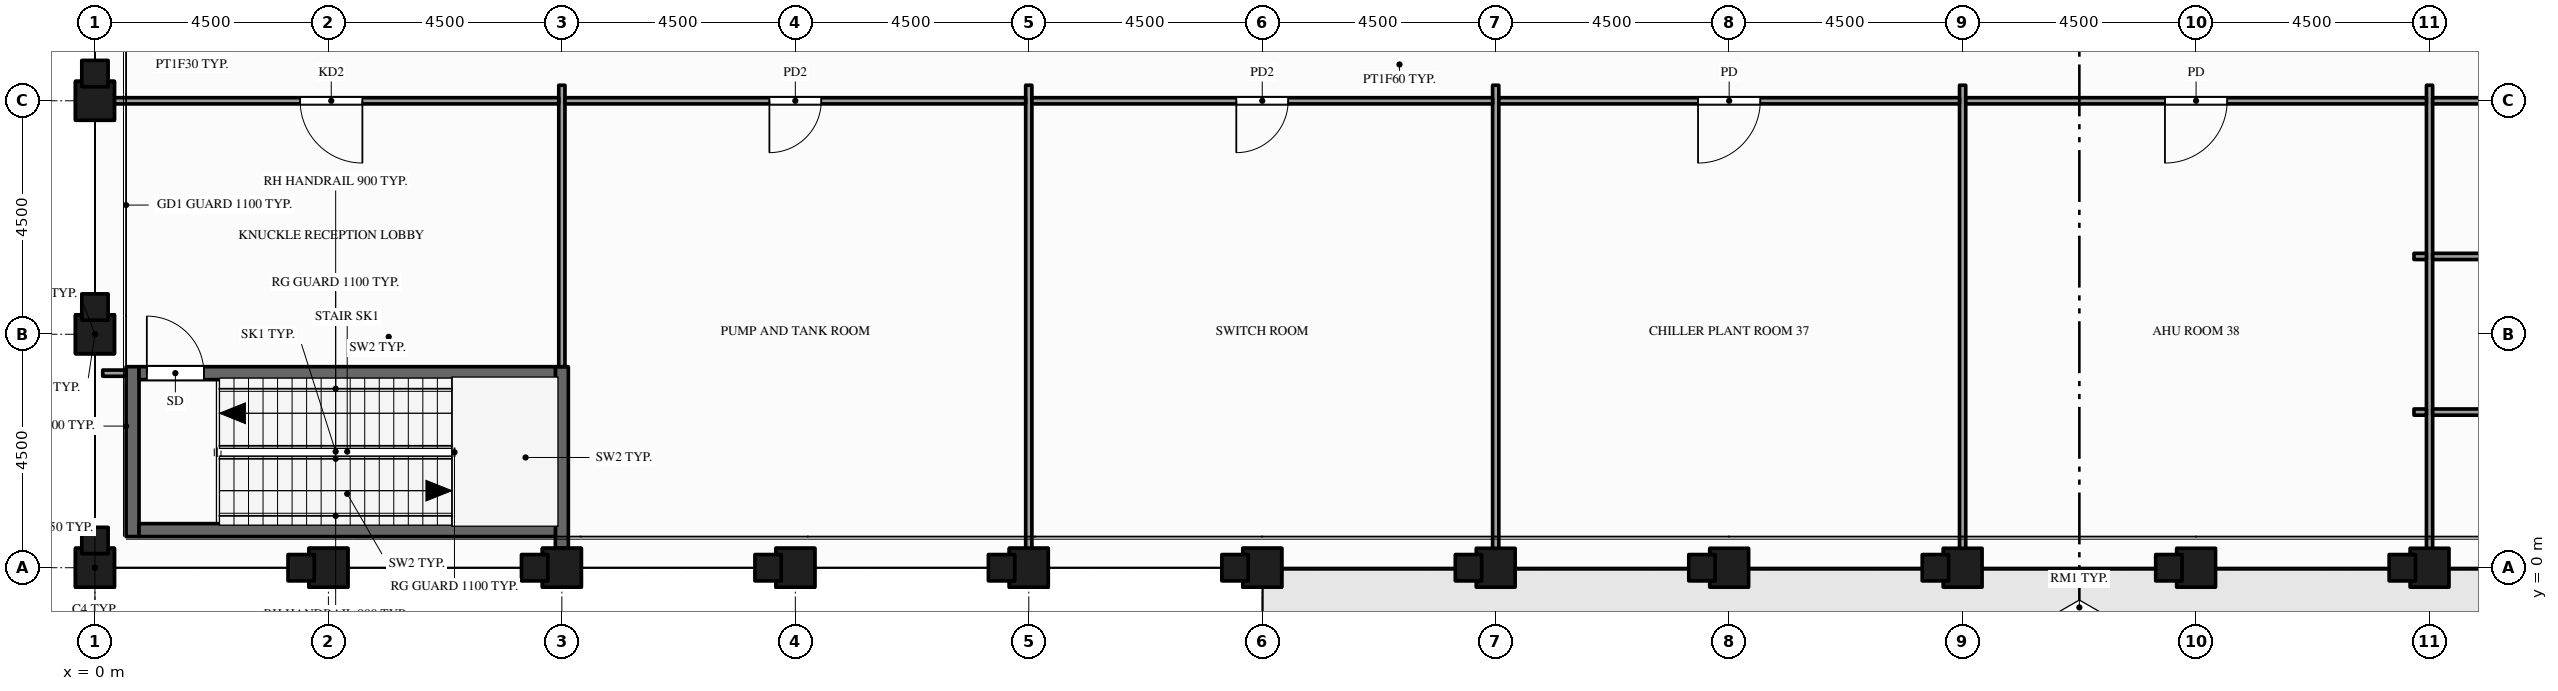
"""IFC4 building model, lengths in metres.
Left out: names, types, materials, properties, quantities, classifications, styles, units other than length and angle.
Written with IfcOpenShell. Run it as: python <this file> out.ifc"""

import sys

from ifc_helpers import new_model, si_unit, direction, frame, frame_2d, origin, origin_2d, place, context, subcontext, project, spatial, rectangle, hollow_rectangle, extrude, element, fill, save


model = new_model("IFC4")
c1 = context("Model", 3, precision=1e-05, world=origin(), true_north=direction((0.0, 1.0)))
c2 = subcontext(c1, "Body", "Model", "MODEL_VIEW")
j1 = project(units=[si_unit("LENGTHUNIT", "METRE"), si_unit("PLANEANGLEUNIT", "RADIAN")], contexts=[c1])
p1 = place(None, origin())
s1 = spatial("IfcSite", under=j1, at=p1, CompositionType="ELEMENT")
p2 = place(p1, origin())
s2 = spatial("IfcBuilding", under=s1, at=p2, CompositionType="ELEMENT")
p3 = place(p2, frame((0.0, 0.0, 243.0)))
s3 = spatial("IfcBuildingStorey", under=s2, at=p3, CompositionType="ELEMENT", Elevation=243.0)
p4 = place(p3, frame((0.0, 0.0, -0.25), z_axis=(0.0, 0.0, 1.0), x_axis=(1.0, 0.0, 0.0)))
e1 = element("IfcColumn", 1, at=p4, inside=s3, PredefinedType="COLUMN", context=c2, shape_type="SweptSolid", body=[
    extrude(hollow_rectangle(XDim=0.75, YDim=0.75, WallThickness=0.036, at=origin_2d()), origin(), (0.0, 0.0, 1.0), 4.6),
])
p5 = place(p3, frame((0.0, 0.0, 4.35), z_axis=(0.0, 0.0, 1.0), x_axis=(1.0, 0.0, 0.0)))
e2 = element("IfcColumn", 2, at=p5, inside=s3, PredefinedType="COLUMN", context=c2, shape_type="SweptSolid", body=[
    extrude(rectangle(XDim=0.75, YDim=0.75, at=origin_2d()), origin(), (0.0, 0.0, 1.0), 1.5),
])
p6 = place(p3, frame((0.0, 4.5, -0.25), z_axis=(0.0, 0.0, 1.0), x_axis=(1.0, 0.0, 0.0)))
e3 = element("IfcColumn", 3, at=p6, inside=s3, PredefinedType="COLUMN", context=c2, shape_type="SweptSolid", body=[
    extrude(hollow_rectangle(XDim=0.75, YDim=0.75, WallThickness=0.036, at=origin_2d()), origin(), (0.0, 0.0, 1.0), 4.6),
])
p7 = place(p3, frame((0.0, 4.5, 4.35), z_axis=(0.0, 0.0, 1.0), x_axis=(1.0, 0.0, 0.0)))
e4 = element("IfcColumn", 4, at=p7, inside=s3, PredefinedType="COLUMN", context=c2, shape_type="SweptSolid", body=[
    extrude(rectangle(XDim=0.75, YDim=0.75, at=origin_2d()), origin(), (0.0, 0.0, 1.0), 1.5),
])
p8 = place(p3, frame((0.0, 9.0, -0.25), z_axis=(0.0, 0.0, 1.0), x_axis=(1.0, 0.0, 0.0)))
e5 = element("IfcColumn", 5, at=p8, inside=s3, PredefinedType="COLUMN", context=c2, shape_type="SweptSolid", body=[
    extrude(hollow_rectangle(XDim=0.75, YDim=0.75, WallThickness=0.036, at=origin_2d()), origin(), (0.0, 0.0, 1.0), 4.6),
])
p9 = place(p3, frame((0.0, 9.0, 4.35), z_axis=(0.0, 0.0, 1.0), x_axis=(1.0, 0.0, 0.0)))
e6 = element("IfcColumn", 6, at=p9, inside=s3, PredefinedType="COLUMN", context=c2, shape_type="SweptSolid", body=[
    extrude(rectangle(XDim=0.75, YDim=0.75, at=origin_2d()), origin(), (0.0, 0.0, 1.0), 1.5),
])
p10 = place(p3, frame((4.5, 0.0, -0.25), z_axis=(0.0, 0.0, 1.0), x_axis=(1.0, 0.0, 0.0)))
e7 = element("IfcColumn", 7, at=p10, inside=s3, PredefinedType="COLUMN", context=c2, shape_type="SweptSolid", body=[
    extrude(hollow_rectangle(XDim=0.75, YDim=0.75, WallThickness=0.036, at=origin_2d()), origin(), (0.0, 0.0, 1.0), 4.6),
])
p11 = place(p3, frame((4.5, 0.0, 4.35), z_axis=(0.0, 0.0, 1.0), x_axis=(1.0, 0.0, 0.0)))
e8 = element("IfcColumn", 8, at=p11, inside=s3, PredefinedType="COLUMN", context=c2, shape_type="SweptSolid", body=[
    extrude(rectangle(XDim=0.75, YDim=0.75, at=origin_2d()), origin(), (0.0, 0.0, 1.0), 1.5),
])
p12 = place(p3, frame((9.0, 0.0, -0.25), z_axis=(0.0, 0.0, 1.0), x_axis=(1.0, 0.0, 0.0)))
e9 = element("IfcColumn", 9, at=p12, inside=s3, PredefinedType="COLUMN", context=c2, shape_type="SweptSolid", body=[
    extrude(hollow_rectangle(XDim=0.75, YDim=0.75, WallThickness=0.036, at=origin_2d()), origin(), (0.0, 0.0, 1.0), 4.6),
])
p13 = place(p3, frame((9.0, 0.0, 4.35), z_axis=(0.0, 0.0, 1.0), x_axis=(1.0, 0.0, 0.0)))
e10 = element("IfcColumn", 10, at=p13, inside=s3, PredefinedType="COLUMN", context=c2, shape_type="SweptSolid", body=[
    extrude(rectangle(XDim=0.75, YDim=0.75, at=origin_2d()), origin(), (0.0, 0.0, 1.0), 1.5),
])
p14 = place(p3, frame((13.5, 0.0, -0.25), z_axis=(0.0, 0.0, 1.0), x_axis=(1.0, 0.0, 0.0)))
e11 = element("IfcColumn", 11, at=p14, inside=s3, PredefinedType="COLUMN", context=c2, shape_type="SweptSolid", body=[
    extrude(hollow_rectangle(XDim=0.75, YDim=0.75, WallThickness=0.036, at=origin_2d()), origin(), (0.0, 0.0, 1.0), 4.6),
])
p15 = place(p3, frame((13.5, 0.0, 4.35), z_axis=(0.0, 0.0, 1.0), x_axis=(1.0, 0.0, 0.0)))
e12 = element("IfcColumn", 12, at=p15, inside=s3, PredefinedType="COLUMN", context=c2, shape_type="SweptSolid", body=[
    extrude(rectangle(XDim=0.75, YDim=0.75, at=origin_2d()), origin(), (0.0, 0.0, 1.0), 1.5),
])
p16 = place(p3, frame((18.0, 0.0, -0.25), z_axis=(0.0, 0.0, 1.0), x_axis=(1.0, 0.0, 0.0)))
e13 = element("IfcColumn", 13, at=p16, inside=s3, PredefinedType="COLUMN", context=c2, shape_type="SweptSolid", body=[
    extrude(hollow_rectangle(XDim=0.75, YDim=0.75, WallThickness=0.036, at=origin_2d()), origin(), (0.0, 0.0, 1.0), 4.6),
])
p17 = place(p3, frame((18.0, 0.0, 4.35), z_axis=(0.0, 0.0, 1.0), x_axis=(1.0, 0.0, 0.0)))
e14 = element("IfcColumn", 14, at=p17, inside=s3, PredefinedType="COLUMN", context=c2, shape_type="SweptSolid", body=[
    extrude(rectangle(XDim=0.75, YDim=0.75, at=origin_2d()), origin(), (0.0, 0.0, 1.0), 1.5),
])
p18 = place(p3, frame((22.5, 0.0, -0.3), z_axis=(0.0, 0.0, 1.0), x_axis=(1.0, 0.0, 0.0)))
e15 = element("IfcColumn", 15, at=p18, inside=s3, PredefinedType="COLUMN", context=c2, shape_type="SweptSolid", body=[
    extrude(hollow_rectangle(XDim=0.75, YDim=0.75, WallThickness=0.036, at=origin_2d()), origin(), (0.0, 0.0, 1.0), 4.65),
])
p19 = place(p3, frame((22.5, 0.0, 4.35), z_axis=(0.0, 0.0, 1.0), x_axis=(1.0, 0.0, 0.0)))
e16 = element("IfcColumn", 16, at=p19, inside=s3, PredefinedType="COLUMN", context=c2, shape_type="SweptSolid", body=[
    extrude(rectangle(XDim=0.75, YDim=0.75, at=origin_2d()), origin(), (0.0, 0.0, 1.0), 1.5),
])
for number, where, z_axis, x_axis in (
    (17, (27.0, 0.0, -0.3), (0.0, 0.0, 1.0), (1.0, 0.0, 0.0)),
    (18, (31.5, 0.0, -0.3), (0.0, 0.0, 1.0), (1.0, 0.0, 0.0)),
    (19, (36.0, 0.0, -0.3), (0.0, 0.0, 1.0), (1.0, 0.0, 0.0)),
    (20, (40.5, 0.0, -0.3), (0.0, 0.0, 1.0), (1.0, 0.0, 0.0)),
    (21, (45.0, 0.0, -0.3), (0.0, 0.0, 1.0), (1.0, 0.0, 0.0)),
):
    element("IfcColumn", number, at=place(p3, frame(where, z_axis=z_axis, x_axis=x_axis)), inside=s3, PredefinedType="COLUMN", context=c2, shape_type="SweptSolid", body=[
        extrude(hollow_rectangle(XDim=0.75, YDim=0.75, WallThickness=0.036, at=origin_2d()), origin(), (0.0, 0.0, 1.0), 6.15),
    ])
p20 = place(p3, frame((0.725, 0.6, 0.0), z_axis=(0.0, 0.0, 1.0), x_axis=(0.0, 1.0, 0.0)))
e22 = element("IfcWall", 22, at=p20, inside=s3, PredefinedType="SHEAR", context=c2, shape_type="SweptSolid", body=[
    extrude(rectangle(XDim=3.275, YDim=0.25, at=frame_2d((1.637, 0.0))), origin(), (0.0, 0.0, 1.0), 5.85),
])
p21 = place(p3, frame((9.0, 0.375, 0.0), z_axis=(0.0, 0.0, 1.0), x_axis=(0.0, 1.0, 0.0)))
e23 = element("IfcWall", 23, at=p21, inside=s3, PredefinedType="SHEAR", context=c2, shape_type="SweptSolid", body=[
    extrude(rectangle(XDim=3.5, YDim=0.25, at=frame_2d((1.75, 0.0))), origin(), (0.0, 0.0, 1.0), 5.85),
])
p22 = place(p3, frame((9.0, 3.875, 0.0), z_axis=(0.0, 0.0, 1.0), x_axis=(0.0, 1.0, 0.0)))
e24 = element("IfcWall", 24, at=p22, inside=s3, PredefinedType="PARTITIONING", context=c2, shape_type="SweptSolid", body=[
    extrude(rectangle(XDim=5.425, YDim=0.12, at=frame_2d((2.712, 0.0))), origin(), (0.0, 0.0, 1.0), 4.87),
])
p23 = place(p3, frame((18.0, 0.15, 0.0), z_axis=(0.0, 0.0, 1.0), x_axis=(0.0, 1.0, 0.0)))
e25 = element("IfcWall", 25, at=p23, inside=s3, PredefinedType="PARTITIONING", context=c2, shape_type="SweptSolid", body=[
    extrude(rectangle(XDim=9.15, YDim=0.12, at=frame_2d((4.575, 0.0))), origin(), (0.0, 0.0, 1.0), 4.87),
])
for number, where, z_axis, x_axis in (
    (26, (27.0, 0.15, 0.0), (0.0, 0.0, 1.0), (0.0, 1.0, 0.0)),
    (27, (36.0, 0.15, 0.0), (0.0, 0.0, 1.0), (0.0, 1.0, 0.0)),
    (28, (45.0, 0.15, 0.0), (0.0, 0.0, 1.0), (0.0, 1.0, 0.0)),
):
    element("IfcWall", number, at=place(p3, frame(where, z_axis=z_axis, x_axis=x_axis)), inside=s3, PredefinedType="PARTITIONING", context=c2, shape_type="SweptSolid", body=[
        extrude(rectangle(XDim=9.15, YDim=0.12, at=frame_2d((4.575, 0.0))), origin(), (0.0, 0.0, 1.0), 4.45),
    ])
p24 = place(p3, frame((0.85, 0.725, 0.0), z_axis=(0.0, 0.0, 1.0), x_axis=(1.0, 0.0, 0.0)))
e29 = element("IfcWall", 29, at=p24, inside=s3, PredefinedType="SHEAR", context=c2, shape_type="SweptSolid", body=[
    extrude(rectangle(XDim=8.025, YDim=0.25, at=frame_2d((4.012, 0.0))), origin(), (0.0, 0.0, 1.0), 5.85),
])
p25 = place(p3, frame((44.7, 3.0, 0.0), z_axis=(0.0, 0.0, 1.0), x_axis=(1.0, 0.0, 0.0)))
e30 = element("IfcWall", 30, at=p25, inside=s3, PredefinedType="PARTITIONING", context=c2, shape_type="SweptSolid", body=[
    extrude(rectangle(XDim=0.24, YDim=0.12, at=frame_2d((0.12, 0.0))), origin(), (0.0, 0.0, 1.0), 4.87),
])
p26 = place(p3, frame((45.06, 3.0, 0.0), z_axis=(0.0, 0.0, 1.0), x_axis=(1.0, 0.0, 0.0)))
e31 = element("IfcWall", 31, at=p26, inside=s3, PredefinedType="PARTITIONING", context=c2, shape_type="SweptSolid", body=[
    extrude(rectangle(XDim=4.38, YDim=0.12, at=frame_2d((2.19, 0.0))), origin(), (0.0, 0.0, 1.0), 4.87),
])
p27 = place(p3, frame((0.15, 3.75, 0.0), z_axis=(0.0, 0.0, 1.0), x_axis=(1.0, 0.0, 0.0)))
e32 = element("IfcWall", 32, at=p27, inside=s3, PredefinedType="PARTITIONING", context=c2, shape_type="SweptSolid", body=[
    extrude(rectangle(XDim=0.45, YDim=0.12, at=frame_2d((0.225, 0.0))), origin(), (0.0, 0.0, 1.0), 5.85),
])
p28 = place(p3, frame((0.85, 3.75, 0.0), z_axis=(0.0, 0.0, 1.0), x_axis=(1.0, 0.0, 0.0)))
e33 = element("IfcWall", 33, at=p28, inside=s3, PredefinedType="SHEAR", context=c2, shape_type="SweptSolid", body=[
    extrude(rectangle(XDim=8.025, YDim=0.25, at=frame_2d((4.012, 0.0))), origin(), (0.0, 0.0, 1.0), 5.85),
])
p29 = place(p28, frame((0.15, 0.0, 0.0)))
e34 = element("IfcOpeningElement", 34, at=p29, cuts=e33, PredefinedType="OPENING", context=c2, shape_type="SweptSolid", body=[
    extrude(rectangle(XDim=1.1, YDim=2.1, at=frame_2d((0.55, 1.05))), frame((0.0, 0.135, 0.0), z_axis=(0.0, -1.0, 0.0), x_axis=(1.0, 0.0, 0.0)), (0.0, 0.0, 1.0), 0.27),
])
p30 = place(p3, frame((44.7, 6.0, 0.0), z_axis=(0.0, 0.0, 1.0), x_axis=(1.0, 0.0, 0.0)))
e35 = element("IfcWall", 35, at=p30, inside=s3, PredefinedType="PARTITIONING", context=c2, shape_type="SweptSolid", body=[
    extrude(rectangle(XDim=0.24, YDim=0.12, at=frame_2d((0.12, 0.0))), origin(), (0.0, 0.0, 1.0), 4.87),
])
p31 = place(p3, frame((45.06, 6.0, 0.0), z_axis=(0.0, 0.0, 1.0), x_axis=(1.0, 0.0, 0.0)))
e36 = element("IfcWall", 36, at=p31, inside=s3, PredefinedType="PARTITIONING", context=c2, shape_type="SweptSolid", body=[
    extrude(rectangle(XDim=4.38, YDim=0.12, at=frame_2d((2.19, 0.0))), origin(), (0.0, 0.0, 1.0), 4.87),
])
p32 = place(p3, frame((0.15, 9.0, 0.0), z_axis=(0.0, 0.0, 1.0), x_axis=(1.0, 0.0, 0.0)))
e37 = element("IfcWall", 37, at=p32, inside=s3, PredefinedType="PARTITIONING", context=c2, shape_type="SweptSolid", body=[
    extrude(rectangle(XDim=8.79, YDim=0.12, at=frame_2d((4.395, 0.0))), origin(), (0.0, 0.0, 1.0), 4.87),
])
p33 = place(p32, frame((3.805, 0.0, 0.0)))
e38 = element("IfcOpeningElement", 38, at=p33, cuts=e37, PredefinedType="OPENING", context=c2, shape_type="SweptSolid", body=[
    extrude(rectangle(XDim=1.2, YDim=2.1, at=frame_2d((0.6, 1.05))), frame((0.0, 0.07, 0.0), z_axis=(0.0, -1.0, 0.0), x_axis=(1.0, 0.0, 0.0)), (0.0, 0.0, 1.0), 0.14),
])
p34 = place(p3, frame((9.06, 9.0, 0.0), z_axis=(0.0, 0.0, 1.0), x_axis=(1.0, 0.0, 0.0)))
e39 = element("IfcWall", 39, at=p34, inside=s3, PredefinedType="PARTITIONING", context=c2, shape_type="SweptSolid", body=[
    extrude(rectangle(XDim=8.88, YDim=0.12, at=frame_2d((4.44, 0.0))), origin(), (0.0, 0.0, 1.0), 4.87),
])
p35 = place(p34, frame((3.94, 0.0, 0.0)))
e40 = element("IfcOpeningElement", 40, at=p35, cuts=e39, PredefinedType="OPENING", context=c2, shape_type="SweptSolid", body=[
    extrude(rectangle(XDim=1.0, YDim=2.1, at=frame_2d((0.5, 1.05))), frame((0.0, 0.07, 0.0), z_axis=(0.0, -1.0, 0.0), x_axis=(1.0, 0.0, 0.0)), (0.0, 0.0, 1.0), 0.14),
])
p36 = place(p3, frame((18.06, 9.0, 0.0), z_axis=(0.0, 0.0, 1.0), x_axis=(1.0, 0.0, 0.0)))
e41 = element("IfcWall", 41, at=p36, inside=s3, PredefinedType="PARTITIONING", context=c2, shape_type="SweptSolid", body=[
    extrude(rectangle(XDim=8.88, YDim=0.12, at=frame_2d((4.44, 0.0))), origin(), (0.0, 0.0, 1.0), 4.87),
])
p37 = place(p36, frame((3.94, 0.0, 0.0)))
e42 = element("IfcOpeningElement", 42, at=p37, cuts=e41, PredefinedType="OPENING", context=c2, shape_type="SweptSolid", body=[
    extrude(rectangle(XDim=1.0, YDim=2.1, at=frame_2d((0.5, 1.05))), frame((0.0, 0.07, 0.0), z_axis=(0.0, -1.0, 0.0), x_axis=(1.0, 0.0, 0.0)), (0.0, 0.0, 1.0), 0.14),
])
p38 = place(p3, frame((27.06, 9.0, 0.0), z_axis=(0.0, 0.0, 1.0), x_axis=(1.0, 0.0, 0.0)))
e43 = element("IfcWall", 43, at=p38, inside=s3, PredefinedType="PARTITIONING", context=c2, shape_type="SweptSolid", body=[
    extrude(rectangle(XDim=8.88, YDim=0.12, at=frame_2d((4.44, 0.0))), origin(), (0.0, 0.0, 1.0), 4.87),
])
p39 = place(p38, frame((3.84, 0.0, 0.0)))
e44 = element("IfcOpeningElement", 44, at=p39, cuts=e43, PredefinedType="OPENING", context=c2, shape_type="SweptSolid", body=[
    extrude(rectangle(XDim=1.2, YDim=2.1, at=frame_2d((0.6, 1.05))), frame((0.0, 0.07, 0.0), z_axis=(0.0, -1.0, 0.0), x_axis=(1.0, 0.0, 0.0)), (0.0, 0.0, 1.0), 0.14),
])
p40 = place(p3, frame((36.06, 9.0, 0.0), z_axis=(0.0, 0.0, 1.0), x_axis=(1.0, 0.0, 0.0)))
e45 = element("IfcWall", 45, at=p40, inside=s3, PredefinedType="PARTITIONING", context=c2, shape_type="SweptSolid", body=[
    extrude(rectangle(XDim=8.88, YDim=0.12, at=frame_2d((4.44, 0.0))), origin(), (0.0, 0.0, 1.0), 4.87),
])
p41 = place(p40, frame((3.84, 0.0, 0.0)))
e46 = element("IfcOpeningElement", 46, at=p41, cuts=e45, PredefinedType="OPENING", context=c2, shape_type="SweptSolid", body=[
    extrude(rectangle(XDim=1.2, YDim=2.1, at=frame_2d((0.6, 1.05))), frame((0.0, 0.07, 0.0), z_axis=(0.0, -1.0, 0.0), x_axis=(1.0, 0.0, 0.0)), (0.0, 0.0, 1.0), 0.14),
])
p42 = place(p3, frame((45.06, 9.0, 0.0), z_axis=(0.0, 0.0, 1.0), x_axis=(1.0, 0.0, 0.0)))
e47 = element("IfcWall", 47, at=p42, inside=s3, PredefinedType="PARTITIONING", context=c2, shape_type="SweptSolid", body=[
    extrude(rectangle(XDim=4.38, YDim=0.12, at=frame_2d((2.19, 0.0))), origin(), (0.0, 0.0, 1.0), 4.87),
])
p43 = place(p29, origin())
e48 = element("IfcDoor", 48, at=p43, inside=s3, OperationType="SINGLE_SWING_LEFT", PredefinedType="DOOR", context=c2, shape_type="SweptSolid", body=[
    extrude(rectangle(XDim=1.1, YDim=2.1, at=frame_2d((0.55, 1.05))), frame((0.0, 0.025, 0.0), z_axis=(0.0, -1.0, 0.0), x_axis=(1.0, 0.0, 0.0)), (0.0, 0.0, 1.0), 0.05),
])
fill(e34, e48)
p44 = place(p33, origin())
e49 = element("IfcDoor", 49, at=p44, inside=s3, OperationType="SINGLE_SWING_RIGHT", PredefinedType="DOOR", context=c2, shape_type="SweptSolid", body=[
    extrude(rectangle(XDim=1.2, YDim=2.1, at=frame_2d((0.6, 1.05))), frame((0.0, 0.025, 0.0), z_axis=(0.0, -1.0, 0.0), x_axis=(1.0, 0.0, 0.0)), (0.0, 0.0, 1.0), 0.05),
])
fill(e38, e49)
p45 = place(p35, origin())
e50 = element("IfcDoor", 50, at=p45, inside=s3, OperationType="SINGLE_SWING_LEFT", PredefinedType="DOOR", context=c2, shape_type="SweptSolid", body=[
    extrude(rectangle(XDim=1.0, YDim=2.1, at=frame_2d((0.5, 1.05))), frame((0.0, 0.025, 0.0), z_axis=(0.0, -1.0, 0.0), x_axis=(1.0, 0.0, 0.0)), (0.0, 0.0, 1.0), 0.05),
])
fill(e40, e50)
p46 = place(p37, origin())
e51 = element("IfcDoor", 51, at=p46, inside=s3, OperationType="SINGLE_SWING_LEFT", PredefinedType="DOOR", context=c2, shape_type="SweptSolid", body=[
    extrude(rectangle(XDim=1.0, YDim=2.1, at=frame_2d((0.5, 1.05))), frame((0.0, 0.025, 0.0), z_axis=(0.0, -1.0, 0.0), x_axis=(1.0, 0.0, 0.0)), (0.0, 0.0, 1.0), 0.05),
])
fill(e42, e51)
p47 = place(p39, origin())
e52 = element("IfcDoor", 52, at=p47, inside=s3, OperationType="SINGLE_SWING_LEFT", PredefinedType="DOOR", context=c2, shape_type="SweptSolid", body=[
    extrude(rectangle(XDim=1.2, YDim=2.1, at=frame_2d((0.6, 1.05))), frame((0.0, 0.025, 0.0), z_axis=(0.0, -1.0, 0.0), x_axis=(1.0, 0.0, 0.0)), (0.0, 0.0, 1.0), 0.05),
])
fill(e44, e52)
p48 = place(p41, origin())
e53 = element("IfcDoor", 53, at=p48, inside=s3, OperationType="SINGLE_SWING_LEFT", PredefinedType="DOOR", context=c2, shape_type="SweptSolid", body=[
    extrude(rectangle(XDim=1.2, YDim=2.1, at=frame_2d((0.6, 1.05))), frame((0.0, 0.025, 0.0), z_axis=(0.0, -1.0, 0.0), x_axis=(1.0, 0.0, 0.0)), (0.0, 0.0, 1.0), 0.05),
])
fill(e46, e53)
save(model, sys.argv[1])
